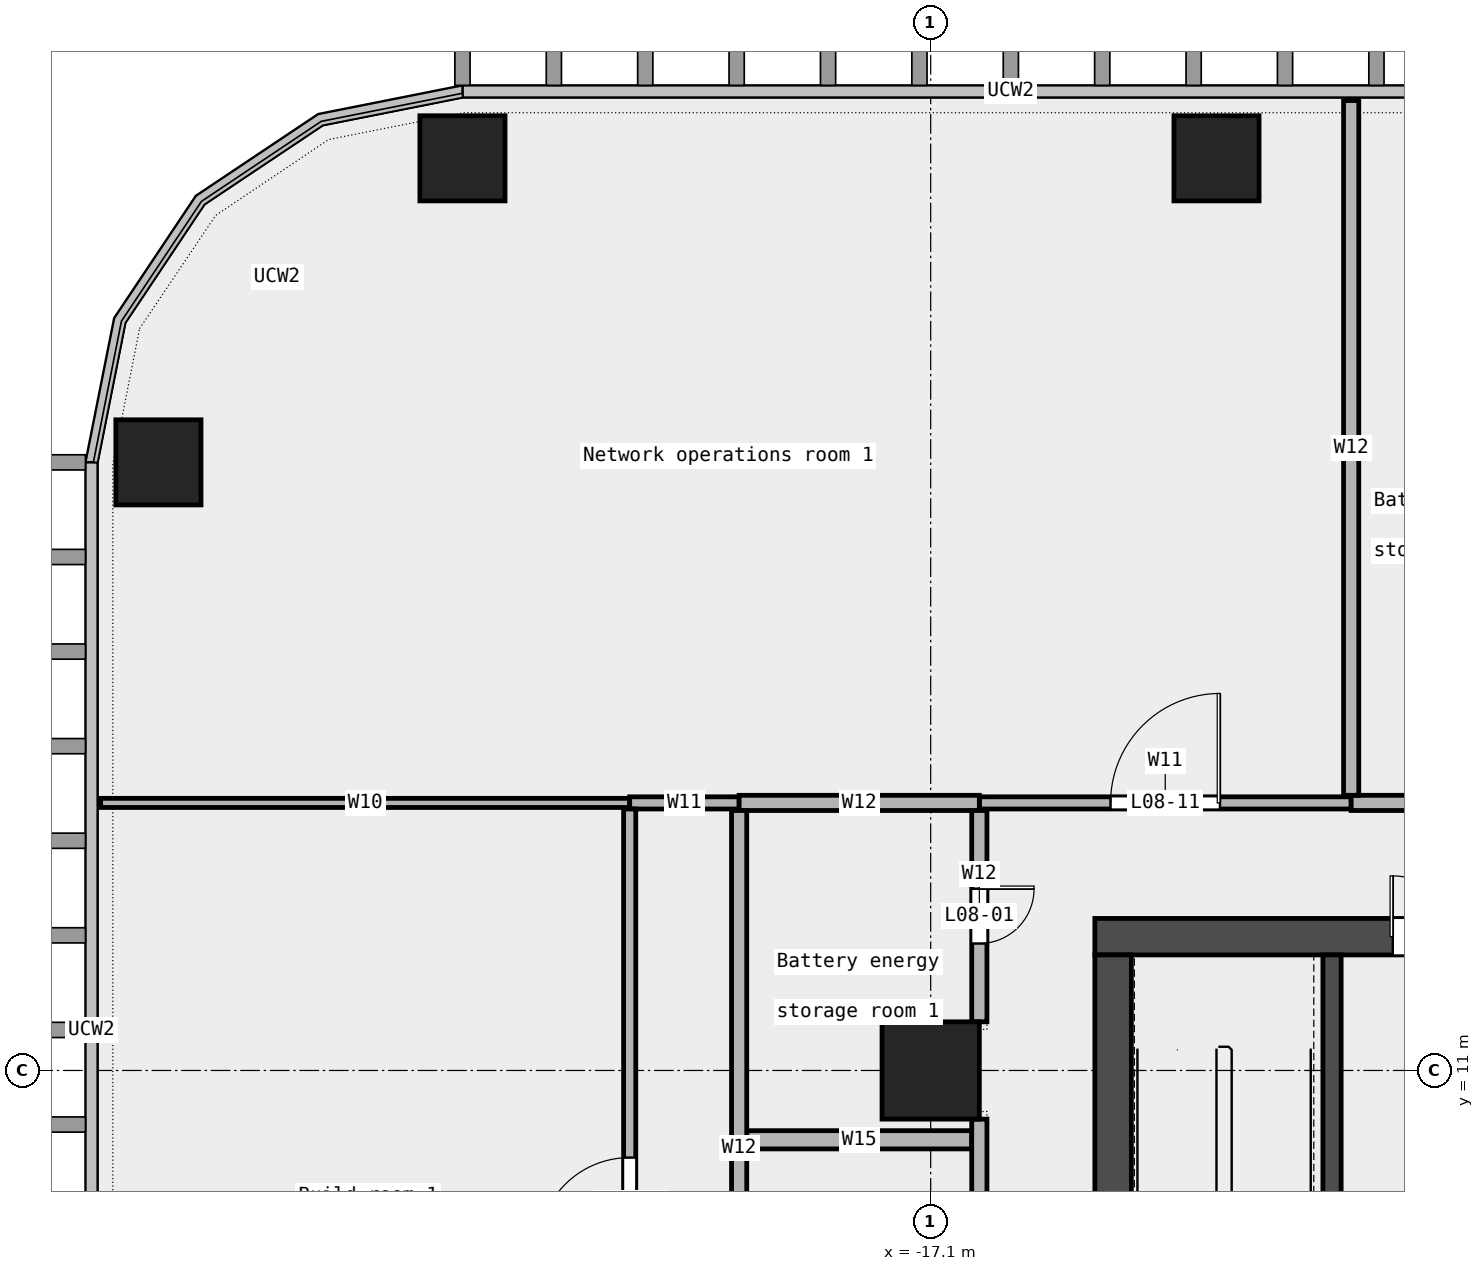
"""IFC4 building model, lengths in metres.
Left out: names, types, materials, properties, quantities, classifications, styles, units other than length and angle.
Written with IfcOpenShell. Run it as: python <this file> out.ifc"""

import sys

from ifc_helpers import new_model, si_unit, direction, frame, frame_2d, origin, origin_2d, place, context, subcontext, project, spatial, rectangle, extrude, element, fill, save


model = new_model("IFC4")
c1 = context("Model", 3, precision=1e-05, world=origin(), true_north=direction((0.0, 1.0)))
c2 = subcontext(c1, "Body", "Model", "MODEL_VIEW")
j1 = project(units=[si_unit("LENGTHUNIT", "METRE"), si_unit("PLANEANGLEUNIT", "RADIAN")], contexts=[c1])
p1 = place(None, origin())
s1 = spatial("IfcSite", under=j1, at=p1, CompositionType="ELEMENT")
p2 = place(p1, origin())
s2 = spatial("IfcBuilding", under=s1, at=p2, CompositionType="ELEMENT")
p3 = place(p2, frame((0.0, 0.0, 45.4)))
s3 = spatial("IfcBuildingStorey", under=s2, at=p3, CompositionType="ELEMENT", Elevation=45.4)
for number, where, z_axis, x_axis in (
    (1, (-12.4, 26.0, 0.0), (0.0, 0.0, 1.0), (1.0, 0.0, 0.0)),
    (2, (-24.8, 26.0, 0.0), (0.0, 0.0, 1.0), (1.0, 0.0, 0.0)),
    (3, (-29.8, 21.0, 0.0), (0.0, 0.0, 1.0), (1.0, 0.0, 0.0)),
):
    element("IfcColumn", number, at=place(p3, frame(where, z_axis=z_axis, x_axis=x_axis)), inside=s3, PredefinedType="COLUMN", context=c2, shape_type="SweptSolid", body=[
        extrude(rectangle(XDim=1.4, YDim=1.4, at=origin_2d()), origin(), (0.0, 0.0, 1.0), 4.35),
    ])
p4 = place(p3, frame((-17.1, 11.0, 0.0), z_axis=(0.0, 0.0, 1.0), x_axis=(1.0, 0.0, 0.0)))
e4 = element("IfcColumn", 4, at=p4, inside=s3, PredefinedType="COLUMN", context=c2, shape_type="SweptSolid", body=[
    extrude(rectangle(XDim=1.6, YDim=1.6, at=origin_2d()), origin(), (0.0, 0.0, 1.0), 4.35),
])
p5 = place(p3, frame((-20.125, 9.86, 0.0), z_axis=(0.0, 0.0, 1.0), x_axis=(1.0, 0.0, 0.0)))
e5 = element("IfcWall", 5, at=p5, inside=s3, PredefinedType="PARTITIONING", context=c2, shape_type="SweptSolid", body=[
    extrude(rectangle(XDim=3.7, YDim=0.3, at=frame_2d((1.85, 0.0))), origin(), (0.0, 0.0, 1.0), 4.35),
])
p6 = place(p3, frame((-30.75, 15.4, 0.0), z_axis=(0.0, 0.0, 1.0), x_axis=(1.0, 0.0, 0.0)))
e6 = element("IfcWall", 6, at=p6, inside=s3, PredefinedType="PARTITIONING", context=c2, shape_type="SweptSolid", body=[
    extrude(rectangle(XDim=8.7, YDim=0.15, at=frame_2d((4.35, 0.0))), origin(), (0.0, 0.0, 1.0), 4.35),
])
p7 = place(p3, frame((-22.05, 15.4, 0.0), z_axis=(0.0, 0.0, 1.0), x_axis=(1.0, 0.0, 0.0)))
e7 = element("IfcWall", 7, at=p7, inside=s3, PredefinedType="PARTITIONING", context=c2, shape_type="SweptSolid", body=[
    extrude(rectangle(XDim=1.8, YDim=0.2, at=frame_2d((0.9, 0.0))), origin(), (0.0, 0.0, 1.0), 4.35),
])
p8 = place(p3, frame((-16.3, 15.4, 0.0), z_axis=(0.0, 0.0, 1.0), x_axis=(1.0, 0.0, 0.0)))
e8 = element("IfcWall", 8, at=p8, inside=s3, PredefinedType="PARTITIONING", context=c2, shape_type="SweptSolid", body=[
    extrude(rectangle(XDim=6.115, YDim=0.2, at=frame_2d((3.058, 0.0))), origin(), (0.0, 0.0, 1.0), 4.35),
])
p9 = place(p8, frame((2.157, 0.0, 0.0)))
e9 = element("IfcOpeningElement", 9, at=p9, cuts=e8, PredefinedType="OPENING", context=c2, shape_type="SweptSolid", body=[
    extrude(rectangle(XDim=1.8, YDim=2.1, at=frame_2d((0.9, 1.05))), frame((0.0, 0.112, 0.0), z_axis=(0.0, -1.0, 0.0), x_axis=(1.0, 0.0, 0.0)), (0.0, 0.0, 1.0), 0.224),
])
p10 = place(p3, frame((-20.25, 15.4, 0.0), z_axis=(0.0, 0.0, 1.0), x_axis=(1.0, 0.0, 0.0)))
e10 = element("IfcWall", 10, at=p10, inside=s3, PredefinedType="PARTITIONING", context=c2, shape_type="SweptSolid", body=[
    extrude(rectangle(XDim=3.95, YDim=0.25, at=frame_2d((1.975, 0.0))), origin(), (0.0, 0.0, 1.0), 4.35),
])
p11 = place(p3, frame((-10.185, 15.4, 0.0), z_axis=(0.0, 0.0, 1.0), x_axis=(1.0, 0.0, 0.0)))
e11 = element("IfcWall", 11, at=p11, inside=s3, PredefinedType="PARTITIONING", context=c2, shape_type="SweptSolid", body=[
    extrude(rectangle(XDim=3.42, YDim=0.25, at=frame_2d((1.71, 0.0))), origin(), (0.0, 0.0, 1.0), 4.35),
])
p12 = place(p11, frame((1.26, 0.0, 0.0)))
e12 = element("IfcOpeningElement", 12, at=p12, cuts=e11, PredefinedType="OPENING", context=c2, shape_type="SweptSolid", body=[
    extrude(rectangle(XDim=0.9, YDim=2.1, at=frame_2d((0.45, 1.05))), frame((0.0, 0.137, 0.0), z_axis=(0.0, -1.0, 0.0), x_axis=(1.0, 0.0, 0.0)), (0.0, 0.0, 1.0), 0.274),
])
p13 = place(p3, frame((-22.05, -9.0, 0.0), z_axis=(0.0, 0.0, 1.0), x_axis=(0.0, 1.0, 0.0)))
e13 = element("IfcWall", 13, at=p13, inside=s3, PredefinedType="PARTITIONING", context=c2, shape_type="SweptSolid", body=[
    extrude(rectangle(XDim=24.3, YDim=0.2, at=frame_2d((12.15, 0.0))), origin(), (0.0, 0.0, 1.0), 4.35),
])
p14 = place(p13, frame((17.067, 0.0, 0.0)))
e14 = element("IfcOpeningElement", 14, at=p14, cuts=e13, PredefinedType="OPENING", context=c2, shape_type="SweptSolid", body=[
    extrude(rectangle(XDim=1.5, YDim=2.1, at=frame_2d((0.75, 1.05))), frame((0.0, 0.112, 0.0), z_axis=(0.0, -1.0, 0.0), x_axis=(1.0, 0.0, 0.0)), (0.0, 0.0, 1.0), 0.224),
])
p15 = place(p13, frame((4.768, 0.0, 0.0)))
e15 = element("IfcOpeningElement", 15, at=p15, cuts=e13, PredefinedType="OPENING", context=c2, shape_type="SweptSolid", body=[
    extrude(rectangle(XDim=1.8, YDim=2.1, at=frame_2d((0.9, 1.05))), frame((0.0, 0.112, 0.0), z_axis=(0.0, -1.0, 0.0), x_axis=(1.0, 0.0, 0.0)), (0.0, 0.0, 1.0), 0.224),
])
p16 = place(p3, frame((-20.25, 4.175, 0.0), z_axis=(0.0, 0.0, 1.0), x_axis=(0.0, 1.0, 0.0)))
e16 = element("IfcWall", 16, at=p16, inside=s3, PredefinedType="PARTITIONING", context=c2, shape_type="SweptSolid", body=[
    extrude(rectangle(XDim=11.1, YDim=0.25, at=frame_2d((5.55, 0.0))), origin(), (0.0, 0.0, 1.0), 4.35),
])
p17 = place(p3, frame((-16.3, 4.175, 0.0), z_axis=(0.0, 0.0, 1.0), x_axis=(0.0, 1.0, 0.0)))
e17 = element("IfcWall", 17, at=p17, inside=s3, PredefinedType="PARTITIONING", context=c2, shape_type="SweptSolid", body=[
    extrude(rectangle(XDim=6.025, YDim=0.25, at=frame_2d((3.012, 0.0))), origin(), (0.0, 0.0, 1.0), 4.35),
])
p18 = place(p17, frame((2.393, 0.0, 0.0)))
e18 = element("IfcOpeningElement", 18, at=p18, cuts=e17, PredefinedType="OPENING", context=c2, shape_type="SweptSolid", body=[
    extrude(rectangle(XDim=0.9, YDim=2.1, at=frame_2d((0.45, 1.05))), frame((0.0, 0.137, 0.0), z_axis=(0.0, -1.0, 0.0), x_axis=(1.0, 0.0, 0.0)), (0.0, 0.0, 1.0), 0.274),
])
p19 = place(p3, frame((-16.3, 11.8, 0.0), z_axis=(0.0, 0.0, 1.0), x_axis=(0.0, 1.0, 0.0)))
e19 = element("IfcWall", 19, at=p19, inside=s3, PredefinedType="PARTITIONING", context=c2, shape_type="SweptSolid", body=[
    extrude(rectangle(XDim=3.475, YDim=0.25, at=frame_2d((1.737, 0.0))), origin(), (0.0, 0.0, 1.0), 4.35),
])
p20 = place(p19, frame((1.288, 0.0, 0.0)))
e20 = element("IfcOpeningElement", 20, at=p20, cuts=e19, PredefinedType="OPENING", context=c2, shape_type="SweptSolid", body=[
    extrude(rectangle(XDim=0.9, YDim=2.1, at=frame_2d((0.45, 1.05))), frame((0.0, 0.137, 0.0), z_axis=(0.0, -1.0, 0.0), x_axis=(1.0, 0.0, 0.0)), (0.0, 0.0, 1.0), 0.274),
])
p21 = place(p3, frame((-10.185, 15.525, 0.0), z_axis=(0.0, 0.0, 1.0), x_axis=(0.0, 1.0, 0.0)))
e21 = element("IfcWall", 21, at=p21, inside=s3, PredefinedType="PARTITIONING", context=c2, shape_type="SweptSolid", body=[
    extrude(rectangle(XDim=11.425, YDim=0.25, at=frame_2d((5.712, 0.0))), origin(), (0.0, 0.0, 1.0), 4.35),
])
p22 = place(p3, frame((-14.4, 13.2, 0.0), z_axis=(0.0, 0.0, 1.0), x_axis=(1.0, 0.0, 0.0)))
e22 = element("IfcWall", 22, at=p22, inside=s3, PredefinedType="SHEAR", context=c2, shape_type="SweptSolid", body=[
    extrude(rectangle(XDim=28.8, YDim=0.6, at=frame_2d((14.4, 0.0))), origin(), (0.0, 0.0, 1.0), 4.5),
])
p23 = place(p22, frame((4.9, 0.0, 0.0)))
e23 = element("IfcOpeningElement", 23, at=p23, cuts=e22, PredefinedType="OPENING", context=c2, shape_type="SweptSolid", body=[
    extrude(rectangle(XDim=1.0, YDim=2.1, at=frame_2d((0.5, 1.05))), frame((0.0, 0.312, 0.0), z_axis=(0.0, -1.0, 0.0), x_axis=(1.0, 0.0, 0.0)), (0.0, 0.0, 1.0), 0.624),
])
p24 = place(p22, frame((9.025, 0.0, 0.0)))
e24 = element("IfcOpeningElement", 24, at=p24, cuts=e22, PredefinedType="OPENING", context=c2, shape_type="SweptSolid", body=[
    extrude(rectangle(XDim=1.0, YDim=2.1, at=frame_2d((0.5, 1.05))), frame((0.0, 0.312, 0.0), z_axis=(0.0, -1.0, 0.0), x_axis=(1.0, 0.0, 0.0)), (0.0, 0.0, 1.0), 0.624),
])
p25 = place(p22, frame((13.337, 0.0, 0.0)))
e25 = element("IfcOpeningElement", 25, at=p25, cuts=e22, PredefinedType="OPENING", context=c2, shape_type="SweptSolid", body=[
    extrude(rectangle(XDim=1.0, YDim=2.1, at=frame_2d((0.5, 1.05))), frame((0.0, 0.312, 0.0), z_axis=(0.0, -1.0, 0.0), x_axis=(1.0, 0.0, 0.0)), (0.0, 0.0, 1.0), 0.624),
])
p26 = place(p22, frame((17.087, 0.0, 0.0)))
e26 = element("IfcOpeningElement", 26, at=p26, cuts=e22, PredefinedType="OPENING", context=c2, shape_type="SweptSolid", body=[
    extrude(rectangle(XDim=1.0, YDim=2.1, at=frame_2d((0.5, 1.05))), frame((0.0, 0.312, 0.0), z_axis=(0.0, -1.0, 0.0), x_axis=(1.0, 0.0, 0.0)), (0.0, 0.0, 1.0), 0.624),
])
p27 = place(p22, frame((21.775, 0.0, 0.0)))
e27 = element("IfcOpeningElement", 27, at=p27, cuts=e22, PredefinedType="OPENING", context=c2, shape_type="SweptSolid", body=[
    extrude(rectangle(XDim=1.0, YDim=2.1, at=frame_2d((0.5, 1.05))), frame((0.0, 0.312, 0.0), z_axis=(0.0, -1.0, 0.0), x_axis=(1.0, 0.0, 0.0)), (0.0, 0.0, 1.0), 0.624),
])
p28 = place(p3, frame((-14.1, -6.6, 0.0), z_axis=(0.0, 0.0, 1.0), x_axis=(0.0, 1.0, 0.0)))
e28 = element("IfcWall", 28, at=p28, inside=s3, PredefinedType="SHEAR", context=c2, shape_type="SweptSolid", body=[
    extrude(rectangle(XDim=19.5, YDim=0.6, at=frame_2d((9.75, 0.0))), origin(), (0.0, 0.0, 1.0), 4.5),
])
p29 = place(p28, frame((9.3, 0.0, 0.0)))
e29 = element("IfcOpeningElement", 29, at=p29, cuts=e28, PredefinedType="OPENING", context=c2, shape_type="SweptSolid", body=[
    extrude(rectangle(XDim=1.8, YDim=2.1, at=frame_2d((0.9, 1.05))), frame((0.0, 0.312, 0.0), z_axis=(0.0, -1.0, 0.0), x_axis=(1.0, 0.0, 0.0)), (0.0, 0.0, 1.0), 0.624),
])
p30 = place(p3, frame((-10.5, 5.25, 0.0), z_axis=(0.0, 0.0, 1.0), x_axis=(0.0, 1.0, 0.0)))
e30 = element("IfcWall", 30, at=p30, inside=s3, PredefinedType="SHEAR", context=c2, shape_type="SweptSolid", body=[
    extrude(rectangle(XDim=7.65, YDim=0.3, at=frame_2d((3.825, 0.0))), origin(), (0.0, 0.0, 1.0), 4.5),
])
p31 = place(p20, origin())
e31 = element("IfcDoor", 31, at=p31, inside=s3, OperationType="SINGLE_SWING_LEFT", PredefinedType="DOOR", context=c2, shape_type="SweptSolid", body=[
    extrude(rectangle(XDim=0.9, YDim=2.1, at=frame_2d((0.45, 1.05))), frame((0.0, 0.025, 0.0), z_axis=(0.0, -1.0, 0.0), x_axis=(1.0, 0.0, 0.0)), (0.0, 0.0, 1.0), 0.05),
])
fill(e20, e31)
p32 = place(p14, origin())
e32 = element("IfcDoor", 32, at=p32, inside=s3, OperationType="DOUBLE_DOOR_SINGLE_SWING", PredefinedType="DOOR", context=c2, shape_type="SweptSolid", body=[
    extrude(rectangle(XDim=1.5, YDim=2.1, at=frame_2d((0.75, 1.05))), frame((0.0, 0.025, 0.0), z_axis=(0.0, -1.0, 0.0), x_axis=(1.0, 0.0, 0.0)), (0.0, 0.0, 1.0), 0.05),
])
fill(e14, e32)
p33 = place(p9, origin())
e33 = element("IfcDoor", 33, at=p33, inside=s3, OperationType="DOUBLE_DOOR_SINGLE_SWING", PredefinedType="DOOR", context=c2, shape_type="SweptSolid", body=[
    extrude(rectangle(XDim=1.8, YDim=2.1, at=frame_2d((0.9, 1.05))), frame((0.0, 0.025, 0.0), z_axis=(0.0, -1.0, 0.0), x_axis=(1.0, 0.0, 0.0)), (0.0, 0.0, 1.0), 0.05),
])
fill(e9, e33)
p34 = place(p23, origin())
e34 = element("IfcDoor", 34, at=p34, inside=s3, OperationType="SINGLE_SWING_LEFT", PredefinedType="DOOR", context=c2, shape_type="SweptSolid", body=[
    extrude(rectangle(XDim=1.0, YDim=2.1, at=frame_2d((0.5, 1.05))), frame((0.0, 0.025, 0.0), z_axis=(0.0, -1.0, 0.0), x_axis=(1.0, 0.0, 0.0)), (0.0, 0.0, 1.0), 0.05),
])
fill(e23, e34)
save(model, sys.argv[1])
